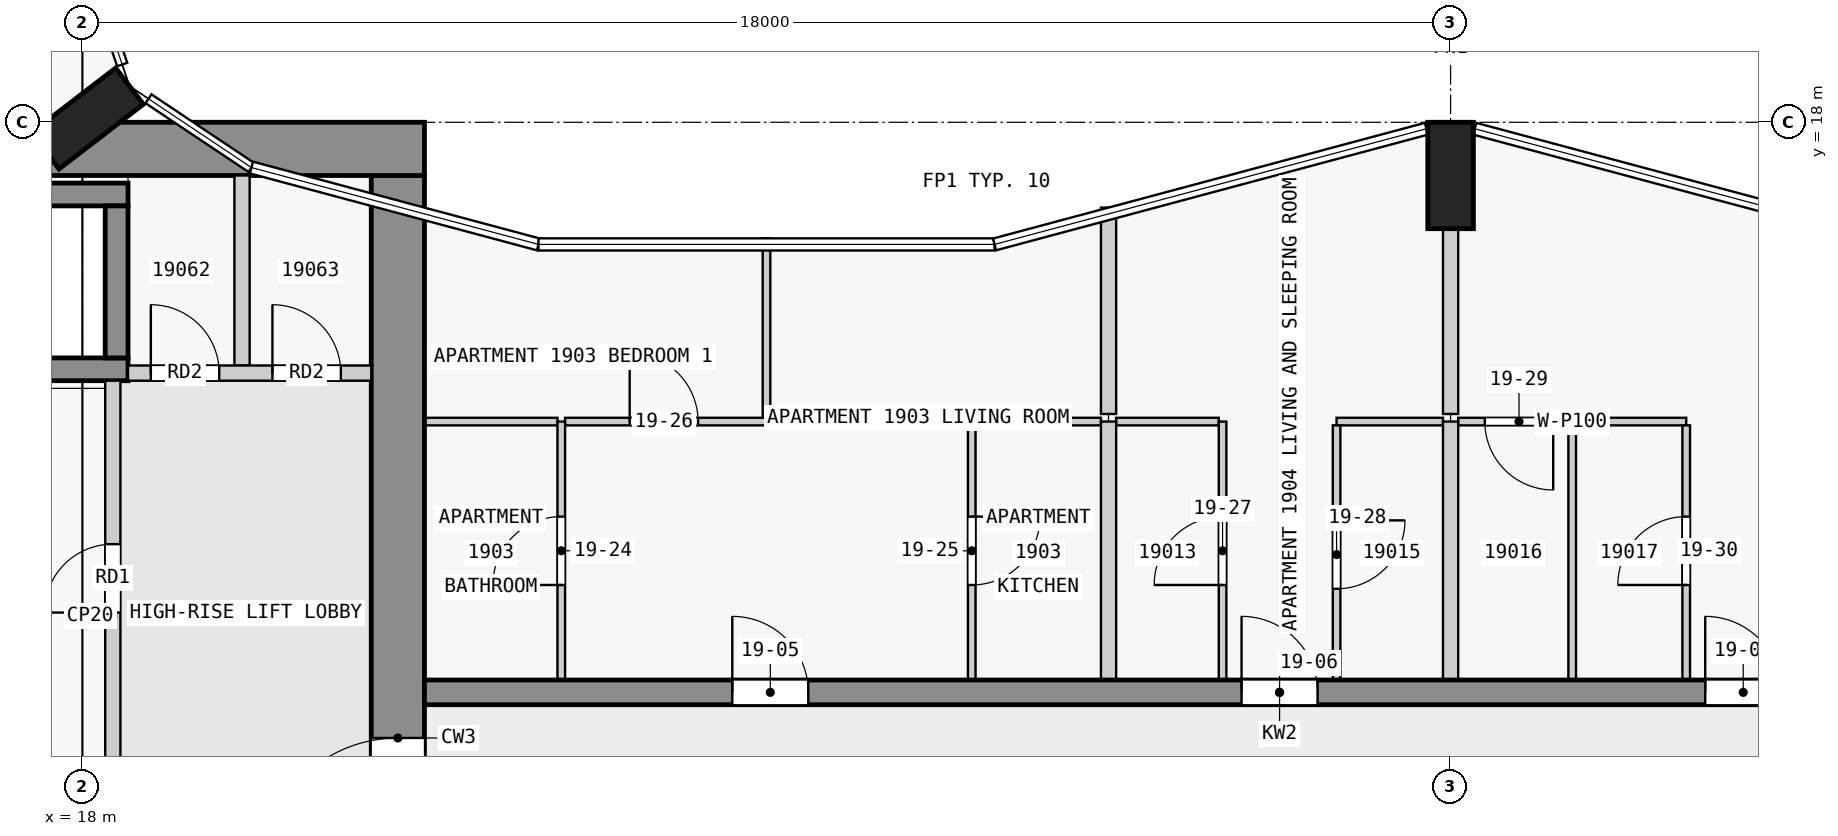
"""IFC4 building model, lengths in metres.
Left out: names, types, materials, properties, quantities, classifications, styles, units other than length and angle.
Written with IfcOpenShell. Run it as: python <this file> out.ifc"""

import sys

from ifc_helpers import new_model, si_unit, direction, frame, frame_2d, origin, origin_2d, place, context, subcontext, project, spatial, rectangle, extrude, element, fill, save


model = new_model("IFC4")
c1 = context("Model", 3, precision=1e-05, world=origin(), true_north=direction((0.0, 1.0)))
c2 = subcontext(c1, "Body", "Model", "MODEL_VIEW")
j1 = project(units=[si_unit("LENGTHUNIT", "METRE"), si_unit("PLANEANGLEUNIT", "RADIAN")], contexts=[c1])
p1 = place(None, origin())
s1 = spatial("IfcSite", under=j1, at=p1, CompositionType="ELEMENT")
p2 = place(p1, origin())
s2 = spatial("IfcBuilding", under=s1, at=p2, CompositionType="ELEMENT")
p3 = place(p2, frame((0.0, 0.0, 78.3)))
s3 = spatial("IfcBuildingStorey", under=s2, at=p3, CompositionType="ELEMENT", Elevation=78.3)
for number, where, z_axis, x_axis in (
    (1, (36.0, 17.3, 0.0), (0.0, 0.0, 1.0), (1.0, 0.0, 0.0)),
    (2, (18.065, 18.05, 0.0), (0.0, 0.0, 1.0), (-0.609, 0.793, 0.0)),
):
    element("IfcColumn", number, at=place(p3, frame(where, z_axis=z_axis, x_axis=x_axis)), inside=s3, PredefinedType="COLUMN", context=c2, shape_type="SweptSolid", body=[
        extrude(rectangle(XDim=0.6, YDim=1.4, at=origin_2d()), origin(), (0.0, 0.0, 1.0), 3.5),
    ])
p4 = place(p3, frame((1.6, 17.65, 0.0), z_axis=(0.0, 0.0, 1.0), x_axis=(1.0, 0.0, 0.0)))
e3 = element("IfcWall", 3, at=p4, inside=s3, PredefinedType="SHEAR", context=c2, shape_type="SweptSolid", body=[
    extrude(rectangle(XDim=20.9, YDim=0.7, at=frame_2d((10.45, 0.0))), origin(), (0.0, 0.0, 1.0), 3.25),
])
p5 = place(p4, frame((6.5, 0.0, 0.0)))
e4 = element("IfcOpeningElement", 4, at=p5, cuts=e3, PredefinedType="OPENING", context=c2, shape_type="SweptSolid", body=[
    extrude(rectangle(XDim=1.8, YDim=2.1, at=frame_2d((0.9, 1.05))), frame((0.0, 0.36, 0.0), z_axis=(0.0, -1.0, 0.0), x_axis=(1.0, 0.0, 0.0)), (0.0, 0.0, 1.0), 0.72),
])
p6 = place(p3, frame((22.15, 2.5, 0.0), z_axis=(0.0, 0.0, 1.0), x_axis=(0.0, 1.0, 0.0)))
e5 = element("IfcWall", 5, at=p6, inside=s3, PredefinedType="SHEAR", context=c2, shape_type="SweptSolid", body=[
    extrude(rectangle(XDim=14.8, YDim=0.7, at=frame_2d((7.4, 0.0))), origin(), (0.0, 0.0, 1.0), 3.25),
])
p7 = place(p6, frame((5.6, 0.0, 0.0)))
e6 = element("IfcOpeningElement", 6, at=p7, cuts=e5, PredefinedType="OPENING", context=c2, shape_type="SweptSolid", body=[
    extrude(rectangle(XDim=1.8, YDim=2.1, at=frame_2d((0.9, 1.05))), frame((0.0, 0.36, 0.0), z_axis=(0.0, -1.0, 0.0), x_axis=(1.0, 0.0, 0.0)), (0.0, 0.0, 1.0), 0.72),
])
for number, where, z_axis, x_axis in (
    (7, (10.8, 17.05, 0.0), (0.0, 0.0, 1.0), (1.0, 0.0, 0.0)),
    (8, (10.8, 14.75, 0.0), (0.0, 0.0, 1.0), (1.0, 0.0, 0.0)),
):
    element("IfcWall", number, at=place(p3, frame(where, z_axis=z_axis, x_axis=x_axis)), inside=s3, PredefinedType="SHEAR", context=c2, shape_type="SweptSolid", body=[
        extrude(rectangle(XDim=7.8, YDim=0.3, at=frame_2d((3.9, 0.0))), origin(), (0.0, 0.0, 1.0), 3.25),
    ])
p8 = place(p3, frame((18.45, 14.9, 0.0), z_axis=(0.0, 0.0, 1.0), x_axis=(0.0, 1.0, 0.0)))
e9 = element("IfcWall", 9, at=p8, inside=s3, PredefinedType="SHEAR", context=c2, shape_type="SweptSolid", body=[
    extrude(rectangle(XDim=2.0, YDim=0.3, at=frame_2d((1.0, 0.0))), origin(), (0.0, 0.0, 1.0), 3.25),
])
p9 = place(p3, frame((22.5, 10.5, 0.0), z_axis=(0.0, 0.0, 1.0), x_axis=(1.0, 0.0, 0.0)))
e10 = element("IfcWall", 10, at=p9, inside=s3, PredefinedType="SHEAR", context=c2, shape_type="SweptSolid", body=[
    extrude(rectangle(XDim=22.5, YDim=0.325, at=frame_2d((11.25, 0.0))), origin(), (0.0, 0.0, 1.0), 3.25),
])
p10 = place(p9, frame((4.05, 0.0, 0.0)))
e11 = element("IfcOpeningElement", 11, at=p10, cuts=e10, PredefinedType="OPENING", context=c2, shape_type="SweptSolid", body=[
    extrude(rectangle(XDim=1.0, YDim=2.1, at=frame_2d((0.5, 1.05))), frame((0.0, 0.172, 0.0), z_axis=(0.0, -1.0, 0.0), x_axis=(1.0, 0.0, 0.0)), (0.0, 0.0, 1.0), 0.345),
])
p11 = place(p9, frame((10.75, 0.0, 0.0)))
e12 = element("IfcOpeningElement", 12, at=p11, cuts=e10, PredefinedType="OPENING", context=c2, shape_type="SweptSolid", body=[
    extrude(rectangle(XDim=1.0, YDim=2.1, at=frame_2d((0.5, 1.05))), frame((0.0, 0.172, 0.0), z_axis=(0.0, -1.0, 0.0), x_axis=(1.0, 0.0, 0.0)), (0.0, 0.0, 1.0), 0.345),
])
p12 = place(p9, frame((16.85, 0.0, 0.0)))
e13 = element("IfcOpeningElement", 13, at=p12, cuts=e10, PredefinedType="OPENING", context=c2, shape_type="SweptSolid", body=[
    extrude(rectangle(XDim=1.0, YDim=2.1, at=frame_2d((0.5, 1.05))), frame((0.0, 0.172, 0.0), z_axis=(0.0, -1.0, 0.0), x_axis=(1.0, 0.0, 0.0)), (0.0, 0.0, 1.0), 0.345),
])
p13 = place(p3, frame((18.4, 8.4, 0.0), z_axis=(0.0, 0.0, 1.0), x_axis=(0.0, 1.0, 0.0)))
e14 = element("IfcWall", 14, at=p13, inside=s3, PredefinedType="PARTITIONING", context=c2, shape_type="SweptSolid", body=[
    extrude(rectangle(XDim=6.2, YDim=0.2, at=frame_2d((3.1, 0.0))), origin(), (0.0, 0.0, 1.0), 3.25),
])
p14 = place(p13, frame((3.15, 0.0, 0.0)))
e15 = element("IfcOpeningElement", 15, at=p14, cuts=e14, PredefinedType="OPENING", context=c2, shape_type="SweptSolid", body=[
    extrude(rectangle(XDim=0.9, YDim=2.1, at=frame_2d((0.45, 1.05))), frame((0.0, 0.11, 0.0), z_axis=(0.0, -1.0, 0.0), x_axis=(1.0, 0.0, 0.0)), (0.0, 0.0, 1.0), 0.22),
])
p15 = place(p3, frame((18.6, 14.7, 0.0), z_axis=(0.0, 0.0, 1.0), x_axis=(1.0, 0.0, 0.0)))
e16 = element("IfcWall", 16, at=p15, inside=s3, PredefinedType="PARTITIONING", context=c2, shape_type="SweptSolid", body=[
    extrude(rectangle(XDim=3.2, YDim=0.2, at=frame_2d((1.6, 0.0))), origin(), (0.0, 0.0, 1.0), 3.25),
])
p16 = place(p15, frame((0.3, 0.0, 0.0)))
e17 = element("IfcOpeningElement", 17, at=p16, cuts=e16, PredefinedType="OPENING", context=c2, shape_type="SweptSolid", body=[
    extrude(rectangle(XDim=0.9, YDim=2.1, at=frame_2d((0.45, 1.05))), frame((0.0, 0.11, 0.0), z_axis=(0.0, -1.0, 0.0), x_axis=(1.0, 0.0, 0.0)), (0.0, 0.0, 1.0), 0.22),
])
p17 = place(p15, frame((1.9, 0.0, 0.0)))
e18 = element("IfcOpeningElement", 18, at=p17, cuts=e16, PredefinedType="OPENING", context=c2, shape_type="SweptSolid", body=[
    extrude(rectangle(XDim=0.9, YDim=2.1, at=frame_2d((0.45, 1.05))), frame((0.0, 0.11, 0.0), z_axis=(0.0, -1.0, 0.0), x_axis=(1.0, 0.0, 0.0)), (0.0, 0.0, 1.0), 0.22),
])
p18 = place(p3, frame((20.1, 14.8, 0.0), z_axis=(0.0, 0.0, 1.0), x_axis=(0.0, 1.0, 0.0)))
e19 = element("IfcWall", 19, at=p18, inside=s3, PredefinedType="PARTITIONING", context=c2, shape_type="SweptSolid", body=[
    extrude(rectangle(XDim=2.5, YDim=0.2, at=frame_2d((1.25, 0.0))), origin(), (0.0, 0.0, 1.0), 3.25),
])
p19 = place(p3, frame((24.25, 14.062, 0.0), z_axis=(0.0, 0.0, 1.0), x_axis=(-1.0, 0.0, 0.0)))
e20 = element("IfcWall", 20, at=p19, inside=s3, PredefinedType="PARTITIONING", context=c2, shape_type="SweptSolid", body=[
    extrude(rectangle(XDim=1.75, YDim=0.1, at=frame_2d((0.875, 0.0))), origin(), (0.0, 0.0, 1.0), 3.25),
])
p20 = place(p3, frame((31.4, 14.062, 0.0), z_axis=(0.0, 0.0, 1.0), x_axis=(-1.0, 0.0, 0.0)))
e21 = element("IfcWall", 21, at=p20, inside=s3, PredefinedType="PARTITIONING", context=c2, shape_type="SweptSolid", body=[
    extrude(rectangle(XDim=1.65, YDim=0.1, at=frame_2d((0.825, 0.0))), origin(), (0.0, 0.0, 1.0), 3.25),
])
p21 = place(p3, frame((32.95, 14.062, 0.0), z_axis=(0.0, 0.0, 1.0), x_axis=(-1.0, 0.0, 0.0)))
e22 = element("IfcWall", 22, at=p21, inside=s3, PredefinedType="PARTITIONING", context=c2, shape_type="SweptSolid", body=[
    extrude(rectangle(XDim=1.35, YDim=0.1, at=frame_2d((0.675, 0.0))), origin(), (0.0, 0.0, 1.0), 3.25),
])
p22 = place(p3, frame((35.9, 14.062, 0.0), z_axis=(0.0, 0.0, 1.0), x_axis=(-1.0, 0.0, 0.0)))
e23 = element("IfcWall", 23, at=p22, inside=s3, PredefinedType="PARTITIONING", context=c2, shape_type="SweptSolid", body=[
    extrude(rectangle(XDim=1.4, YDim=0.1, at=frame_2d((0.7, 0.0))), origin(), (0.0, 0.0, 1.0), 3.25),
])
p23 = place(p3, frame((39.1, 14.062, 0.0), z_axis=(0.0, 0.0, 1.0), x_axis=(-1.0, 0.0, 0.0)))
e24 = element("IfcWall", 24, at=p23, inside=s3, PredefinedType="PARTITIONING", context=c2, shape_type="SweptSolid", body=[
    extrude(rectangle(XDim=3.0, YDim=0.1, at=frame_2d((1.5, 0.0))), origin(), (0.0, 0.0, 1.0), 3.25),
])
p24 = place(p23, frame((1.75, 0.0, 0.0)))
e25 = element("IfcOpeningElement", 25, at=p24, cuts=e24, PredefinedType="OPENING", context=c2, shape_type="SweptSolid", body=[
    extrude(rectangle(XDim=0.9, YDim=2.1, at=frame_2d((0.45, 1.05))), frame((0.0, 0.06, 0.0), z_axis=(0.0, -1.0, 0.0), x_axis=(1.0, 0.0, 0.0)), (0.0, 0.0, 1.0), 0.12),
])
p25 = place(p3, frame((24.35, 14.062, 0.0), z_axis=(0.0, 0.0, 1.0), x_axis=(1.0, 0.0, 0.0)))
e26 = element("IfcWall", 26, at=p25, inside=s3, PredefinedType="PARTITIONING", context=c2, shape_type="SweptSolid", body=[
    extrude(rectangle(XDim=2.65, YDim=0.1, at=frame_2d((1.325, 0.0))), origin(), (0.0, 0.0, 1.0), 3.25),
])
p26 = place(p25, frame((0.85, 0.0, 0.0)))
e27 = element("IfcOpeningElement", 27, at=p26, cuts=e26, PredefinedType="OPENING", context=c2, shape_type="SweptSolid", body=[
    extrude(rectangle(XDim=0.9, YDim=2.1, at=frame_2d((0.45, 1.05))), frame((0.0, 0.06, 0.0), z_axis=(0.0, -1.0, 0.0), x_axis=(1.0, 0.0, 0.0)), (0.0, 0.0, 1.0), 0.12),
])
p27 = place(p3, frame((24.3, 10.663, 0.0), z_axis=(0.0, 0.0, 1.0), x_axis=(0.0, 1.0, 0.0)))
e28 = element("IfcWall", 28, at=p27, inside=s3, PredefinedType="PARTITIONING", context=c2, shape_type="SweptSolid", body=[
    extrude(rectangle(XDim=3.4, YDim=0.1, at=frame_2d((1.7, 0.0))), origin(), (0.0, 0.0, 1.0), 3.25),
])
p28 = place(p27, frame((1.25, 0.0, 0.0)))
e29 = element("IfcOpeningElement", 29, at=p28, cuts=e28, PredefinedType="OPENING", context=c2, shape_type="SweptSolid", body=[
    extrude(rectangle(XDim=0.9, YDim=2.1, at=frame_2d((0.45, 1.05))), frame((0.0, 0.06, 0.0), z_axis=(0.0, -1.0, 0.0), x_axis=(1.0, 0.0, 0.0)), (0.0, 0.0, 1.0), 0.12),
])
p29 = place(p3, frame((27.0, 14.113, 0.0), z_axis=(0.0, 0.0, 1.0), x_axis=(0.0, 1.0, 0.0)))
e30 = element("IfcWall", 30, at=p29, inside=s3, PredefinedType="PARTITIONING", context=c2, shape_type="SweptSolid", body=[
    extrude(rectangle(XDim=2.361, YDim=0.1, at=frame_2d((1.18, 0.0))), origin(), (0.0, 0.0, 1.0), 3.25),
])
p30 = place(p3, frame((29.7, 14.062, 0.0), z_axis=(0.0, 0.0, 1.0), x_axis=(0.0, -1.0, 0.0)))
e31 = element("IfcWall", 31, at=p30, inside=s3, PredefinedType="PARTITIONING", context=c2, shape_type="SweptSolid", body=[
    extrude(rectangle(XDim=3.4, YDim=0.1, at=frame_2d((1.7, 0.0))), origin(), (0.0, 0.0, 1.0), 3.25),
])
p31 = place(p30, frame((1.25, 0.0, 0.0)))
e32 = element("IfcOpeningElement", 32, at=p31, cuts=e31, PredefinedType="OPENING", context=c2, shape_type="SweptSolid", body=[
    extrude(rectangle(XDim=0.9, YDim=2.1, at=frame_2d((0.45, 1.05))), frame((0.0, 0.06, 0.0), z_axis=(0.0, -1.0, 0.0), x_axis=(1.0, 0.0, 0.0)), (0.0, 0.0, 1.0), 0.12),
])
p32 = place(p3, frame((31.5, 16.878, 0.0), z_axis=(0.0, 0.0, 1.0), x_axis=(0.0, -1.0, 0.0)))
e33 = element("IfcWall", 33, at=p32, inside=s3, PredefinedType="PARTITIONING", context=c2, shape_type="SweptSolid", body=[
    extrude(rectangle(XDim=2.715, YDim=0.2, at=frame_2d((1.357, 0.0))), origin(), (0.0, 0.0, 1.0), 3.25),
])
p33 = place(p3, frame((31.5, 10.663, 0.0), z_axis=(0.0, 0.0, 1.0), x_axis=(0.0, 1.0, 0.0)))
e34 = element("IfcWall", 34, at=p33, inside=s3, PredefinedType="PARTITIONING", context=c2, shape_type="SweptSolid", body=[
    extrude(rectangle(XDim=3.4, YDim=0.2, at=frame_2d((1.7, 0.0))), origin(), (0.0, 0.0, 1.0), 3.25),
])
p34 = place(p3, frame((33.0, 10.663, 0.0), z_axis=(0.0, 0.0, 1.0), x_axis=(0.0, 1.0, 0.0)))
e35 = element("IfcWall", 35, at=p34, inside=s3, PredefinedType="PARTITIONING", context=c2, shape_type="SweptSolid", body=[
    extrude(rectangle(XDim=3.4, YDim=0.1, at=frame_2d((1.7, 0.0))), origin(), (0.0, 0.0, 1.0), 3.25),
])
p35 = place(p34, frame((1.25, 0.0, 0.0)))
e36 = element("IfcOpeningElement", 36, at=p35, cuts=e35, PredefinedType="OPENING", context=c2, shape_type="SweptSolid", body=[
    extrude(rectangle(XDim=0.9, YDim=2.1, at=frame_2d((0.45, 1.05))), frame((0.0, 0.06, 0.0), z_axis=(0.0, -1.0, 0.0), x_axis=(1.0, 0.0, 0.0)), (0.0, 0.0, 1.0), 0.12),
])
p36 = place(p3, frame((34.5, 14.012, 0.0), z_axis=(0.0, 0.0, 1.0), x_axis=(0.0, -1.0, 0.0)))
e37 = element("IfcWall", 37, at=p36, inside=s3, PredefinedType="PARTITIONING", context=c2, shape_type="SweptSolid", body=[
    extrude(rectangle(XDim=3.35, YDim=0.1, at=frame_2d((1.675, 0.0))), origin(), (0.0, 0.0, 1.0), 3.25),
])
p37 = place(p36, frame((1.25, 0.0, 0.0)))
e38 = element("IfcOpeningElement", 38, at=p37, cuts=e37, PredefinedType="OPENING", context=c2, shape_type="SweptSolid", body=[
    extrude(rectangle(XDim=0.9, YDim=2.1, at=frame_2d((0.45, 1.05))), frame((0.0, 0.06, 0.0), z_axis=(0.0, -1.0, 0.0), x_axis=(1.0, 0.0, 0.0)), (0.0, 0.0, 1.0), 0.12),
])
p38 = place(p3, frame((36.0, 16.6, 0.0), z_axis=(0.0, 0.0, 1.0), x_axis=(0.0, -1.0, 0.0)))
e39 = element("IfcWall", 39, at=p38, inside=s3, PredefinedType="PARTITIONING", context=c2, shape_type="SweptSolid", body=[
    extrude(rectangle(XDim=2.438, YDim=0.2, at=frame_2d((1.219, 0.0))), origin(), (0.0, 0.0, 1.0), 3.25),
])
p39 = place(p3, frame((36.0, 10.663, 0.0), z_axis=(0.0, 0.0, 1.0), x_axis=(0.0, 1.0, 0.0)))
e40 = element("IfcWall", 40, at=p39, inside=s3, PredefinedType="PARTITIONING", context=c2, shape_type="SweptSolid", body=[
    extrude(rectangle(XDim=3.4, YDim=0.2, at=frame_2d((1.7, 0.0))), origin(), (0.0, 0.0, 1.0), 3.25),
])
p40 = place(p3, frame((37.6, 10.663, 0.0), z_axis=(0.0, 0.0, 1.0), x_axis=(0.0, 1.0, 0.0)))
e41 = element("IfcWall", 41, at=p40, inside=s3, PredefinedType="PARTITIONING", context=c2, shape_type="SweptSolid", body=[
    extrude(rectangle(XDim=3.35, YDim=0.1, at=frame_2d((1.675, 0.0))), origin(), (0.0, 0.0, 1.0), 3.25),
])
p41 = place(p3, frame((39.1, 10.663, 0.0), z_axis=(0.0, 0.0, 1.0), x_axis=(0.0, 1.0, 0.0)))
e42 = element("IfcWall", 42, at=p41, inside=s3, PredefinedType="PARTITIONING", context=c2, shape_type="SweptSolid", body=[
    extrude(rectangle(XDim=3.35, YDim=0.1, at=frame_2d((1.675, 0.0))), origin(), (0.0, 0.0, 1.0), 3.25),
])
p42 = place(p41, frame((1.25, 0.0, 0.0)))
e43 = element("IfcOpeningElement", 43, at=p42, cuts=e42, PredefinedType="OPENING", context=c2, shape_type="SweptSolid", body=[
    extrude(rectangle(XDim=0.9, YDim=2.1, at=frame_2d((0.45, 1.05))), frame((0.0, 0.06, 0.0), z_axis=(0.0, -1.0, 0.0), x_axis=(1.0, 0.0, 0.0)), (0.0, 0.0, 1.0), 0.12),
])
p43 = place(p14, origin())
e44 = element("IfcDoor", 44, at=p43, inside=s3, OperationType="SINGLE_SWING_LEFT", PredefinedType="DOOR", context=c2, shape_type="SweptSolid", body=[
    extrude(rectangle(XDim=0.9, YDim=2.1, at=frame_2d((0.45, 1.05))), frame((0.0, 0.025, 0.0), z_axis=(0.0, -1.0, 0.0), x_axis=(1.0, 0.0, 0.0)), (0.0, 0.0, 1.0), 0.05),
])
fill(e15, e44)
p44 = place(p7, origin())
e45 = element("IfcDoor", 45, at=p44, inside=s3, OperationType="DOUBLE_DOOR_SINGLE_SWING", PredefinedType="DOOR", context=c2, shape_type="SweptSolid", body=[
    extrude(rectangle(XDim=1.8, YDim=2.1, at=frame_2d((0.9, 1.05))), frame((0.0, 0.025, 0.0), z_axis=(0.0, -1.0, 0.0), x_axis=(1.0, 0.0, 0.0)), (0.0, 0.0, 1.0), 0.05),
])
fill(e6, e45)
p45 = place(p16, origin())
e46 = element("IfcDoor", 46, at=p45, inside=s3, OperationType="SINGLE_SWING_LEFT", PredefinedType="DOOR", context=c2, shape_type="SweptSolid", body=[
    extrude(rectangle(XDim=0.9, YDim=2.1, at=frame_2d((0.45, 1.05))), frame((0.0, 0.025, 0.0), z_axis=(0.0, -1.0, 0.0), x_axis=(1.0, 0.0, 0.0)), (0.0, 0.0, 1.0), 0.05),
])
fill(e17, e46)
p46 = place(p17, origin())
e47 = element("IfcDoor", 47, at=p46, inside=s3, OperationType="SINGLE_SWING_LEFT", PredefinedType="DOOR", context=c2, shape_type="SweptSolid", body=[
    extrude(rectangle(XDim=0.9, YDim=2.1, at=frame_2d((0.45, 1.05))), frame((0.0, 0.025, 0.0), z_axis=(0.0, -1.0, 0.0), x_axis=(1.0, 0.0, 0.0)), (0.0, 0.0, 1.0), 0.05),
])
fill(e18, e47)
p47 = place(p10, origin())
e48 = element("IfcDoor", 48, at=p47, inside=s3, OperationType="SINGLE_SWING_LEFT", PredefinedType="DOOR", context=c2, shape_type="SweptSolid", body=[
    extrude(rectangle(XDim=1.0, YDim=2.1, at=frame_2d((0.5, 1.05))), frame((0.0, 0.025, 0.0), z_axis=(0.0, -1.0, 0.0), x_axis=(1.0, 0.0, 0.0)), (0.0, 0.0, 1.0), 0.05),
])
fill(e11, e48)
p48 = place(p11, origin())
e49 = element("IfcDoor", 49, at=p48, inside=s3, OperationType="SINGLE_SWING_LEFT", PredefinedType="DOOR", context=c2, shape_type="SweptSolid", body=[
    extrude(rectangle(XDim=1.0, YDim=2.1, at=frame_2d((0.5, 1.05))), frame((0.0, 0.025, 0.0), z_axis=(0.0, -1.0, 0.0), x_axis=(1.0, 0.0, 0.0)), (0.0, 0.0, 1.0), 0.05),
])
fill(e12, e49)
p49 = place(p12, origin())
e50 = element("IfcDoor", 50, at=p49, inside=s3, OperationType="SINGLE_SWING_RIGHT", PredefinedType="DOOR", context=c2, shape_type="SweptSolid", body=[
    extrude(rectangle(XDim=1.0, YDim=2.1, at=frame_2d((0.5, 1.05))), frame((0.0, 0.025, 0.0), z_axis=(0.0, -1.0, 0.0), x_axis=(1.0, 0.0, 0.0)), (0.0, 0.0, 1.0), 0.05),
])
fill(e13, e50)
p50 = place(p28, origin())
e51 = element("IfcDoor", 51, at=p50, inside=s3, OperationType="SINGLE_SWING_LEFT", PredefinedType="DOOR", context=c2, shape_type="SweptSolid", body=[
    extrude(rectangle(XDim=0.9, YDim=2.1, at=frame_2d((0.45, 1.05))), frame((0.0, 0.025, 0.0), z_axis=(0.0, -1.0, 0.0), x_axis=(1.0, 0.0, 0.0)), (0.0, 0.0, 1.0), 0.05),
])
fill(e29, e51)
p51 = place(p31, origin())
e52 = element("IfcDoor", 52, at=p51, inside=s3, OperationType="SINGLE_SWING_LEFT", PredefinedType="DOOR", context=c2, shape_type="SweptSolid", body=[
    extrude(rectangle(XDim=0.9, YDim=2.1, at=frame_2d((0.45, 1.05))), frame((0.0, 0.025, 0.0), z_axis=(0.0, -1.0, 0.0), x_axis=(1.0, 0.0, 0.0)), (0.0, 0.0, 1.0), 0.05),
])
fill(e32, e52)
p52 = place(p26, origin())
e53 = element("IfcDoor", 53, at=p52, inside=s3, OperationType="SINGLE_SWING_LEFT", PredefinedType="DOOR", context=c2, shape_type="SweptSolid", body=[
    extrude(rectangle(XDim=0.9, YDim=2.1, at=frame_2d((0.45, 1.05))), frame((0.0, 0.025, 0.0), z_axis=(0.0, -1.0, 0.0), x_axis=(1.0, 0.0, 0.0)), (0.0, 0.0, 1.0), 0.05),
])
fill(e27, e53)
p53 = place(p35, origin())
e54 = element("IfcDoor", 54, at=p53, inside=s3, OperationType="SINGLE_SWING_LEFT", PredefinedType="DOOR", context=c2, shape_type="SweptSolid", body=[
    extrude(rectangle(XDim=0.9, YDim=2.1, at=frame_2d((0.45, 1.05))), frame((0.0, 0.025, 0.0), z_axis=(0.0, -1.0, 0.0), x_axis=(1.0, 0.0, 0.0)), (0.0, 0.0, 1.0), 0.05),
])
fill(e36, e54)
p54 = place(p37, origin())
e55 = element("IfcDoor", 55, at=p54, inside=s3, OperationType="SINGLE_SWING_RIGHT", PredefinedType="DOOR", context=c2, shape_type="SweptSolid", body=[
    extrude(rectangle(XDim=0.9, YDim=2.1, at=frame_2d((0.45, 1.05))), frame((0.0, 0.025, 0.0), z_axis=(0.0, -1.0, 0.0), x_axis=(1.0, 0.0, 0.0)), (0.0, 0.0, 1.0), 0.05),
])
fill(e38, e55)
p55 = place(p24, origin())
e56 = element("IfcDoor", 56, at=p55, inside=s3, OperationType="SINGLE_SWING_RIGHT", PredefinedType="DOOR", context=c2, shape_type="SweptSolid", body=[
    extrude(rectangle(XDim=0.9, YDim=2.1, at=frame_2d((0.45, 1.05))), frame((0.0, 0.025, 0.0), z_axis=(0.0, -1.0, 0.0), x_axis=(1.0, 0.0, 0.0)), (0.0, 0.0, 1.0), 0.05),
])
fill(e25, e56)
p56 = place(p42, origin())
e57 = element("IfcDoor", 57, at=p56, inside=s3, OperationType="SINGLE_SWING_RIGHT", PredefinedType="DOOR", context=c2, shape_type="SweptSolid", body=[
    extrude(rectangle(XDim=0.9, YDim=2.1, at=frame_2d((0.45, 1.05))), frame((0.0, 0.025, 0.0), z_axis=(0.0, -1.0, 0.0), x_axis=(1.0, 0.0, 0.0)), (0.0, 0.0, 1.0), 0.05),
])
fill(e43, e57)
save(model, sys.argv[1])
